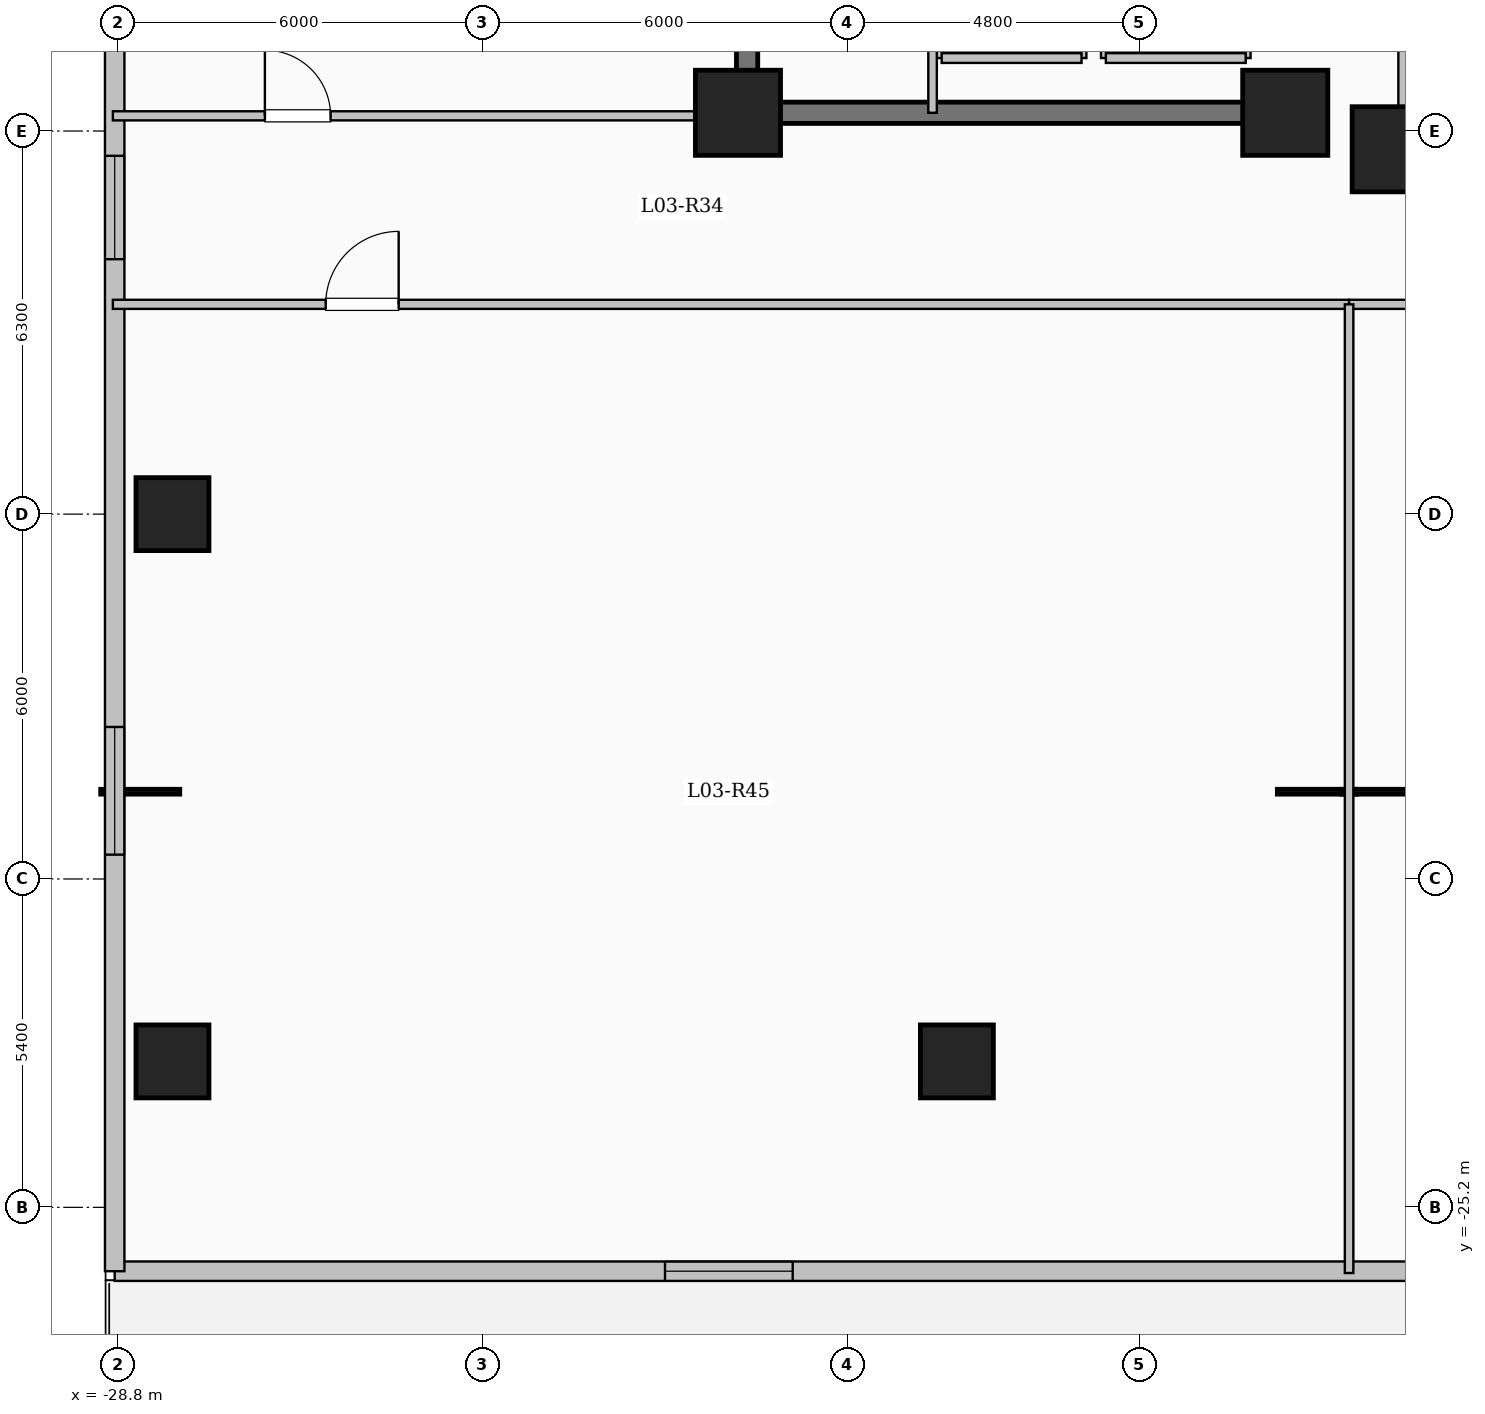
"""IFC4 building model, lengths in metres.
Left out: names, types, materials, properties, quantities, classifications, styles, units other than length and angle.
Written with IfcOpenShell. Run it as: python <this file> out.ifc"""

import sys

from ifc_helpers import new_model, si_unit, direction, frame, frame_2d, origin, origin_2d, place, context, subcontext, project, spatial, rectangle, extrude, element, fill, save


model = new_model("IFC4")
c1 = context("Model", 3, precision=1e-05, world=origin(), true_north=direction((0.0, 1.0)))
c2 = subcontext(c1, "Body", "Model", "MODEL_VIEW")
j1 = project(units=[si_unit("LENGTHUNIT", "METRE"), si_unit("PLANEANGLEUNIT", "RADIAN")], contexts=[c1])
p1 = place(None, origin())
s1 = spatial("IfcSite", under=j1, at=p1, CompositionType="ELEMENT")
p2 = place(p1, origin())
s2 = spatial("IfcBuilding", under=s1, at=p2, CompositionType="ELEMENT")
p3 = place(p2, frame((0.0, 0.0, 14.4)))
s3 = spatial("IfcBuildingStorey", under=s2, at=p3, CompositionType="ELEMENT", Elevation=14.4)
for number, where, z_axis, x_axis in (
    (1, (-7.8, -7.8, 0.0), (0.0, 0.0, 1.0), (1.0, 0.0, 0.0)),
    (2, (-9.6, -7.2, 0.0), (0.0, 0.0, 1.0), (1.0, 0.0, 0.0)),
    (3, (-18.6, -7.2, 0.0), (0.0, 0.0, 1.0), (1.0, 0.0, 0.0)),
):
    element("IfcColumn", number, at=place(p3, frame(where, z_axis=z_axis, x_axis=x_axis)), inside=s3, PredefinedType="COLUMN", context=c2, shape_type="SweptSolid", body=[
        extrude(rectangle(XDim=1.4, YDim=1.4, at=origin_2d()), origin(), (0.0, 0.0, 1.0), 4.5),
    ])
for number, where, z_axis, x_axis in (
    (4, (-27.9, -22.8, 0.0), (0.0, 0.0, 1.0), (1.0, 0.0, 0.0)),
    (5, (-15.0, -22.8, 0.0), (0.0, 0.0, 1.0), (1.0, 0.0, 0.0)),
    (6, (-27.9, -13.8, 0.0), (0.0, 0.0, 1.0), (1.0, 0.0, 0.0)),
):
    element("IfcColumn", number, at=place(p3, frame(where, z_axis=z_axis, x_axis=x_axis)), inside=s3, PredefinedType="COLUMN", context=c2, shape_type="SweptSolid", body=[
        extrude(rectangle(XDim=1.2, YDim=1.2, at=origin_2d()), origin(), (0.0, 0.0, 1.0), 4.5),
    ])
p4 = place(p3, frame((-7.62, 7.62, 0.0), z_axis=(0.0, 0.0, 1.0), x_axis=(0.0, -1.0, 0.0)))
e7 = element("IfcWall", 7, at=p4, inside=s3, PredefinedType="SOLIDWALL", context=c2, shape_type="SweptSolid", body=[
    extrude(rectangle(XDim=15.24, YDim=0.24, at=frame_2d((7.62, 0.0))), origin(), (0.0, 0.0, 1.0), 4.2),
])
p5 = place(p4, frame((6.92, 0.0, 0.95)))
e8 = element("IfcOpeningElement", 8, at=p5, cuts=e7, PredefinedType="OPENING", context=c2, shape_type="SweptSolid", body=[
    extrude(rectangle(XDim=1.4, YDim=1.5, at=frame_2d((0.7, 0.75))), frame((0.0, 0.13, 0.0), z_axis=(0.0, -1.0, 0.0), x_axis=(1.0, 0.0, 0.0)), (0.0, 0.0, 1.0), 0.26),
])
p6 = place(p3, frame((28.85, -26.25, 0.0), z_axis=(0.0, 0.0, 1.0), x_axis=(-1.0, 0.0, 0.0)))
e9 = element("IfcWall", 9, at=p6, inside=s3, PredefinedType="SOLIDWALL", context=c2, shape_type="SweptSolid", body=[
    extrude(rectangle(XDim=57.7, YDim=0.32, at=frame_2d((28.85, 0.0))), origin(), (0.0, 0.0, 1.0), 4.2),
])
p7 = place(p6, frame((32.75, 0.0, 0.0)))
e10 = element("IfcOpeningElement", 10, at=p7, cuts=e9, PredefinedType="OPENING", context=c2, shape_type="SweptSolid", body=[
    extrude(rectangle(XDim=1.25, YDim=2.25, at=frame_2d((0.625, 1.125))), frame((0.0, 0.17, 0.0), z_axis=(0.0, -1.0, 0.0), x_axis=(1.0, 0.0, 0.0)), (0.0, 0.0, 1.0), 0.34),
])
p8 = place(p6, frame((13.775, 0.0, 0.9)))
e11 = element("IfcOpeningElement", 11, at=p8, cuts=e9, PredefinedType="OPENING", context=c2, shape_type="SweptSolid", body=[
    extrude(rectangle(XDim=2.1, YDim=2.0, at=frame_2d((1.05, 1.0))), frame((0.0, 0.17, 0.0), z_axis=(0.0, -1.0, 0.0), x_axis=(1.0, 0.0, 0.0)), (0.0, 0.0, 1.0), 0.34),
])
p9 = place(p6, frame((25.63, 0.0, 0.9)))
e12 = element("IfcOpeningElement", 12, at=p9, cuts=e9, PredefinedType="OPENING", context=c2, shape_type="SweptSolid", body=[
    extrude(rectangle(XDim=2.1, YDim=2.0, at=frame_2d((1.05, 1.0))), frame((0.0, 0.17, 0.0), z_axis=(0.0, -1.0, 0.0), x_axis=(1.0, 0.0, 0.0)), (0.0, 0.0, 1.0), 0.34),
])
p10 = place(p6, frame((46.55, 0.0, 0.9)))
e13 = element("IfcOpeningElement", 13, at=p10, cuts=e9, PredefinedType="OPENING", context=c2, shape_type="SweptSolid", body=[
    extrude(rectangle(XDim=2.1, YDim=2.0, at=frame_2d((1.05, 1.0))), frame((0.0, 0.17, 0.0), z_axis=(0.0, -1.0, 0.0), x_axis=(1.0, 0.0, 0.0)), (0.0, 0.0, 1.0), 0.34),
])
p11 = place(p3, frame((-28.85, -26.25, 0.0), z_axis=(0.0, 0.0, 1.0), x_axis=(0.0, 1.0, 0.0)))
e14 = element("IfcWall", 14, at=p11, inside=s3, PredefinedType="SOLIDWALL", context=c2, shape_type="SweptSolid", body=[
    extrude(rectangle(XDim=56.1, YDim=0.32, at=frame_2d((28.05, 0.0))), origin(), (0.0, 0.0, 1.0), 4.2),
])
p12 = place(p11, frame((6.85, 0.0, 0.9)))
e15 = element("IfcOpeningElement", 15, at=p12, cuts=e14, PredefinedType="OPENING", context=c2, shape_type="SweptSolid", body=[
    extrude(rectangle(XDim=2.1, YDim=2.0, at=frame_2d((1.05, 1.0))), frame((0.0, 0.17, 0.0), z_axis=(0.0, -1.0, 0.0), x_axis=(1.0, 0.0, 0.0)), (0.0, 0.0, 1.0), 0.34),
])
p13 = place(p11, frame((16.643, 0.0, 0.9)))
e16 = element("IfcOpeningElement", 16, at=p13, cuts=e14, PredefinedType="OPENING", context=c2, shape_type="SweptSolid", body=[
    extrude(rectangle(XDim=1.7, YDim=1.9, at=frame_2d((0.85, 0.95))), frame((0.0, 0.17, 0.0), z_axis=(0.0, -1.0, 0.0), x_axis=(1.0, 0.0, 0.0)), (0.0, 0.0, 1.0), 0.34),
])
p14 = place(p11, frame((26.95, 0.0, 0.9)))
e17 = element("IfcOpeningElement", 17, at=p14, cuts=e14, PredefinedType="OPENING", context=c2, shape_type="SweptSolid", body=[
    extrude(rectangle(XDim=2.1, YDim=2.0, at=frame_2d((1.05, 1.0))), frame((0.0, 0.17, 0.0), z_axis=(0.0, -1.0, 0.0), x_axis=(1.0, 0.0, 0.0)), (0.0, 0.0, 1.0), 0.34),
])
p15 = place(p11, frame((37.375, 0.0, 0.95)))
e18 = element("IfcOpeningElement", 18, at=p15, cuts=e14, PredefinedType="OPENING", context=c2, shape_type="SweptSolid", body=[
    extrude(rectangle(XDim=1.0, YDim=1.5, at=frame_2d((0.5, 0.75))), frame((0.0, 0.17, 0.0), z_axis=(0.0, -1.0, 0.0), x_axis=(1.0, 0.0, 0.0)), (0.0, 0.0, 1.0), 0.34),
])
p16 = place(p11, frame((46.4, 0.0, 0.9)))
e19 = element("IfcOpeningElement", 19, at=p16, cuts=e14, PredefinedType="OPENING", context=c2, shape_type="SweptSolid", body=[
    extrude(rectangle(XDim=2.1, YDim=2.0, at=frame_2d((1.05, 1.0))), frame((0.0, 0.17, 0.0), z_axis=(0.0, -1.0, 0.0), x_axis=(1.0, 0.0, 0.0)), (0.0, 0.0, 1.0), 0.34),
])
p17 = place(p3, frame((-12.55, -6.3, 0.0), z_axis=(0.0, 0.0, 1.0), x_axis=(0.0, 1.0, 0.0)))
e20 = element("IfcWall", 20, at=p17, inside=s3, PredefinedType="SOLIDWALL", context=c2, shape_type="SweptSolid", body=[
    extrude(rectangle(XDim=2.6, YDim=0.16, at=frame_2d((1.3, 0.0))), origin(), (0.0, 0.0, 1.0), 4.2),
])
p18 = place(p3, frame((-10.25, -6.3, 0.0), z_axis=(0.0, 0.0, 1.0), x_axis=(0.0, 1.0, 0.0)))
e21 = element("IfcWall", 21, at=p18, inside=s3, PredefinedType="SOLIDWALL", context=c2, shape_type="SweptSolid", body=[
    extrude(rectangle(XDim=2.6, YDim=0.16, at=frame_2d((1.3, 0.0))), origin(), (0.0, 0.0, 1.0), 4.2),
])
p19 = place(p18, frame((0.75, 0.0, 0.0)))
e22 = element("IfcOpeningElement", 22, at=p19, cuts=e21, PredefinedType="OPENING", context=c2, shape_type="SweptSolid", body=[
    extrude(rectangle(XDim=1.1, YDim=2.15, at=frame_2d((0.55, 1.075))), frame((0.0, 0.09, 0.0), z_axis=(0.0, -1.0, 0.0), x_axis=(1.0, 0.0, 0.0)), (0.0, 0.0, 1.0), 0.18),
])
p20 = place(p3, frame((-12.55, -6.3, 0.0), z_axis=(0.0, 0.0, 1.0), x_axis=(1.0, 0.0, 0.0)))
e23 = element("IfcWall", 23, at=p20, inside=s3, PredefinedType="SOLIDWALL", context=c2, shape_type="SweptSolid", body=[
    extrude(rectangle(XDim=2.3, YDim=0.16, at=frame_2d((1.15, 0.0))), origin(), (0.0, 0.0, 1.0), 4.2),
])
for number, where, z_axis, x_axis in (
    (24, (-15.25, -6.3, 0.0), (0.0, 0.0, 1.0), (0.0, 1.0, 0.0)),
    (25, (-12.95, -6.3, 0.0), (0.0, 0.0, 1.0), (0.0, 1.0, 0.0)),
):
    element("IfcWall", number, at=place(p3, frame(where, z_axis=z_axis, x_axis=x_axis)), inside=s3, PredefinedType="SOLIDWALL", context=c2, shape_type="SweptSolid", body=[
        extrude(rectangle(XDim=2.6, YDim=0.16, at=frame_2d((1.3, 0.0))), origin(), (0.0, 0.0, 1.0), 4.2),
    ])
p21 = place(p3, frame((-15.25, -6.3, 0.0), z_axis=(0.0, 0.0, 1.0), x_axis=(1.0, 0.0, 0.0)))
e26 = element("IfcWall", 26, at=p21, inside=s3, PredefinedType="SOLIDWALL", context=c2, shape_type="SweptSolid", body=[
    extrude(rectangle(XDim=2.3, YDim=0.16, at=frame_2d((1.15, 0.0))), origin(), (0.0, 0.0, 1.0), 4.2),
])
p22 = place(p3, frame((-18.45, -7.375, 0.0), z_axis=(0.0, 0.0, 1.0), x_axis=(0.0, 1.0, 0.0)))
e27 = element("IfcWall", 27, at=p22, inside=s3, PredefinedType="SHEAR", context=c2, shape_type="SweptSolid", body=[
    extrude(rectangle(XDim=14.05, YDim=0.35, at=frame_2d((7.025, 0.0))), origin(), (0.0, 0.0, 1.0), 4.5),
])
p23 = place(p3, frame((-18.625, -7.2, 0.0), z_axis=(0.0, 0.0, 1.0), x_axis=(1.0, 0.0, 0.0)))
e28 = element("IfcWall", 28, at=p23, inside=s3, PredefinedType="SHEAR", context=c2, shape_type="SweptSolid", body=[
    extrude(rectangle(XDim=8.55, YDim=0.35, at=frame_2d((4.275, 0.0))), origin(), (0.0, 0.0, 1.0), 4.5),
])
p24 = place(p3, frame((-15.4, -7.2, 0.0), z_axis=(0.0, 0.0, 1.0), x_axis=(0.0, 1.0, 0.0)))
e29 = element("IfcWall", 29, at=p24, inside=s3, PredefinedType="PARTITIONING", context=c2, shape_type="SweptSolid", body=[
    extrude(rectangle(XDim=10.45, YDim=0.14, at=frame_2d((5.225, 0.0))), origin(), (0.0, 0.0, 1.0), 4.2),
])
p25 = place(p24, frame((9.25, 0.0, 0.0)))
e30 = element("IfcOpeningElement", 30, at=p25, cuts=e29, PredefinedType="OPENING", context=c2, shape_type="SweptSolid", body=[
    extrude(rectangle(XDim=0.9, YDim=2.08, at=frame_2d((0.45, 1.04))), frame((0.0, 0.08, 0.0), z_axis=(0.0, -1.0, 0.0), x_axis=(1.0, 0.0, 0.0)), (0.0, 0.0, 1.0), 0.16),
])
p26 = place(p3, frame((-28.88, -10.35, 0.0), z_axis=(0.0, 0.0, 1.0), x_axis=(1.0, 0.0, 0.0)))
e31 = element("IfcWall", 31, at=p26, inside=s3, PredefinedType="PARTITIONING", context=c2, shape_type="SweptSolid", body=[
    extrude(rectangle(XDim=20.33, YDim=0.15, at=frame_2d((10.165, 0.0))), origin(), (0.0, 0.0, 1.0), 4.2),
])
p27 = place(p26, frame((3.5, 0.0, 0.0)))
e32 = element("IfcOpeningElement", 32, at=p27, cuts=e31, PredefinedType="OPENING", context=c2, shape_type="SweptSolid", body=[
    extrude(rectangle(XDim=1.2, YDim=2.15, at=frame_2d((0.6, 1.075))), frame((0.0, 0.085, 0.0), z_axis=(0.0, -1.0, 0.0), x_axis=(1.0, 0.0, 0.0)), (0.0, 0.0, 1.0), 0.17),
])
p28 = place(p3, frame((-8.55, -10.35, 0.0), z_axis=(0.0, 0.0, 1.0), x_axis=(1.0, 0.0, 0.0)))
e33 = element("IfcWall", 33, at=p28, inside=s3, PredefinedType="PARTITIONING", context=c2, shape_type="SweptSolid", body=[
    extrude(rectangle(XDim=17.1, YDim=0.15, at=frame_2d((8.55, 0.0))), origin(), (0.0, 0.0, 1.0), 4.2),
])
p29 = place(p28, frame((3.5, 0.0, 0.0)))
e34 = element("IfcOpeningElement", 34, at=p29, cuts=e33, PredefinedType="OPENING", context=c2, shape_type="SweptSolid", body=[
    extrude(rectangle(XDim=1.2, YDim=2.15, at=frame_2d((0.6, 1.075))), frame((0.0, 0.085, 0.0), z_axis=(0.0, -1.0, 0.0), x_axis=(1.0, 0.0, 0.0)), (0.0, 0.0, 1.0), 0.17),
])
p30 = place(p3, frame((-8.55, -26.28, 0.0), z_axis=(0.0, 0.0, 1.0), x_axis=(0.0, 1.0, 0.0)))
e35 = element("IfcWall", 35, at=p30, inside=s3, PredefinedType="PARTITIONING", context=c2, shape_type="SweptSolid", body=[
    extrude(rectangle(XDim=15.93, YDim=0.14, at=frame_2d((7.965, 0.0))), origin(), (0.0, 0.0, 1.0), 4.2),
])
p31 = place(p3, frame((-28.88, -7.25, 0.0), z_axis=(0.0, 0.0, 1.0), x_axis=(1.0, 0.0, 0.0)))
e36 = element("IfcWall", 36, at=p31, inside=s3, PredefinedType="PARTITIONING", context=c2, shape_type="SweptSolid", body=[
    extrude(rectangle(XDim=10.43, YDim=0.15, at=frame_2d((5.215, 0.0))), origin(), (0.0, 0.0, 1.0), 4.2),
])
p32 = place(p31, frame((2.5, 0.0, 0.0)))
e37 = element("IfcOpeningElement", 37, at=p32, cuts=e36, PredefinedType="OPENING", context=c2, shape_type="SweptSolid", body=[
    extrude(rectangle(XDim=1.08, YDim=2.15, at=frame_2d((0.54, 1.075))), frame((0.0, 0.085, 0.0), z_axis=(0.0, -1.0, 0.0), x_axis=(1.0, 0.0, 0.0)), (0.0, 0.0, 1.0), 0.17),
])
p33 = place(p10, origin())
e38 = element("IfcWindow", 38, at=p33, inside=s3, PartitioningType="SINGLE_PANEL", PredefinedType="WINDOW", context=c2, shape_type="SweptSolid", body=[
    extrude(rectangle(XDim=2.1, YDim=2.0, at=frame_2d((1.05, 1.0))), frame((0.0, 0.03, 0.0), z_axis=(0.0, -1.0, 0.0), x_axis=(1.0, 0.0, 0.0)), (0.0, 0.0, 1.0), 0.06),
])
fill(e13, e38)
p34 = place(p12, origin())
e39 = element("IfcWindow", 39, at=p34, inside=s3, PartitioningType="SINGLE_PANEL", PredefinedType="WINDOW", context=c2, shape_type="SweptSolid", body=[
    extrude(rectangle(XDim=2.1, YDim=2.0, at=frame_2d((1.05, 1.0))), frame((0.0, 0.03, 0.0), z_axis=(0.0, -1.0, 0.0), x_axis=(1.0, 0.0, 0.0)), (0.0, 0.0, 1.0), 0.06),
])
fill(e15, e39)
p35 = place(p13, origin())
e40 = element("IfcWindow", 40, at=p35, inside=s3, PartitioningType="SINGLE_PANEL", PredefinedType="WINDOW", context=c2, shape_type="SweptSolid", body=[
    extrude(rectangle(XDim=1.7, YDim=1.9, at=frame_2d((0.85, 0.95))), frame((0.0, 0.03, 0.0), z_axis=(0.0, -1.0, 0.0), x_axis=(1.0, 0.0, 0.0)), (0.0, 0.0, 1.0), 0.06),
])
fill(e16, e40)
p36 = place(p27, origin())
e41 = element("IfcDoor", 41, at=p36, inside=s3, OperationType="SINGLE_SWING_RIGHT", PredefinedType="DOOR", context=c2, shape_type="SweptSolid", body=[
    extrude(rectangle(XDim=1.2, YDim=2.15, at=frame_2d((0.6, 1.075))), frame((0.0, 0.025, 0.0), z_axis=(0.0, -1.0, 0.0), x_axis=(1.0, 0.0, 0.0)), (0.0, 0.0, 1.0), 0.05),
])
fill(e32, e41)
p37 = place(p32, origin())
e42 = element("IfcDoor", 42, at=p37, inside=s3, OperationType="SINGLE_SWING_LEFT", PredefinedType="DOOR", context=c2, shape_type="SweptSolid", body=[
    extrude(rectangle(XDim=1.08, YDim=2.15, at=frame_2d((0.54, 1.075))), frame((0.0, 0.025, 0.0), z_axis=(0.0, -1.0, 0.0), x_axis=(1.0, 0.0, 0.0)), (0.0, 0.0, 1.0), 0.05),
])
fill(e37, e42)
save(model, sys.argv[1])
